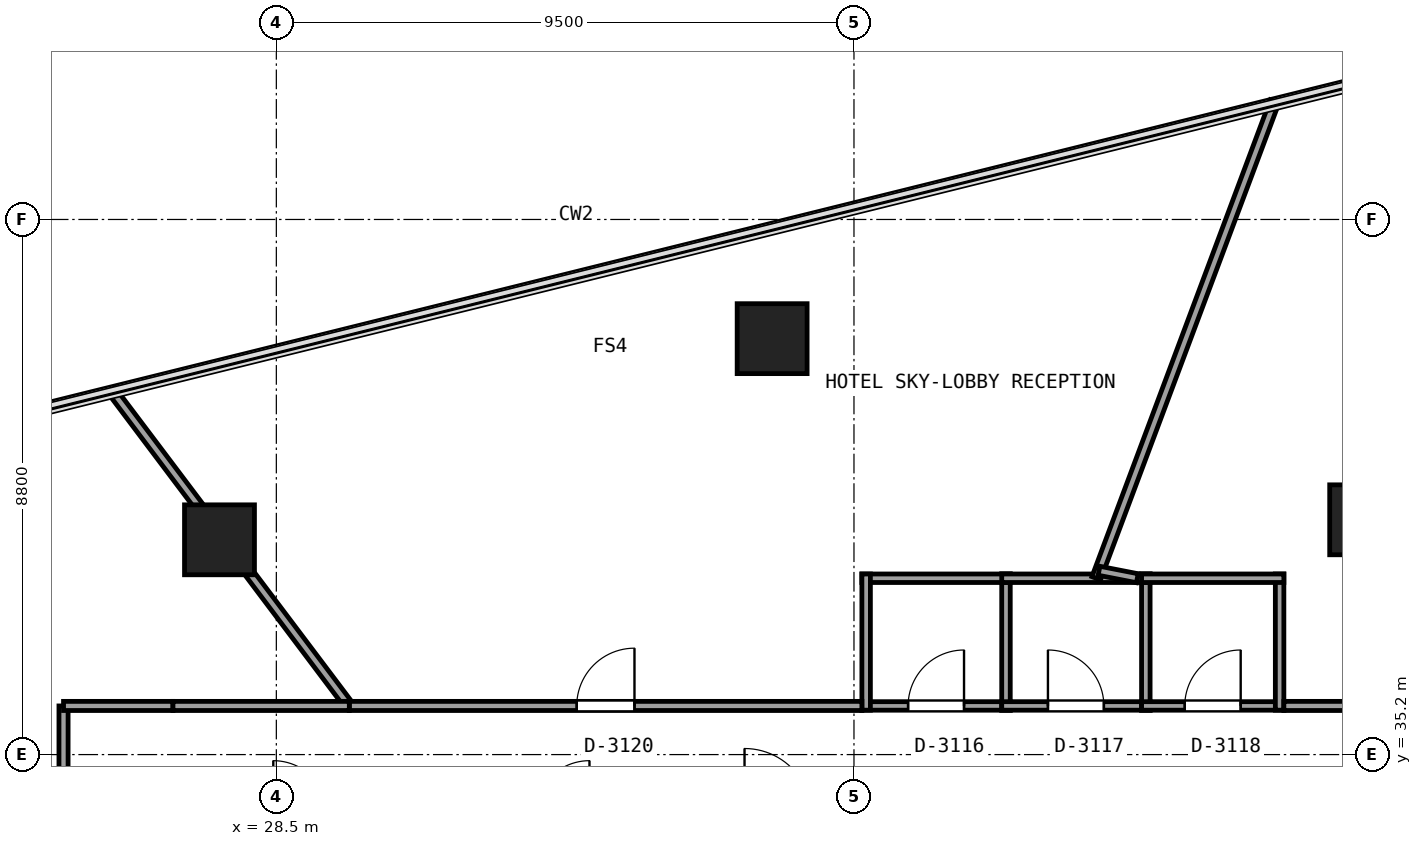
"""IFC4 building model, lengths in metres.
Left out: names, types, materials, properties, quantities, classifications, styles, units other than length and angle.
Written with IfcOpenShell. Run it as: python <this file> out.ifc"""

import sys

from ifc_helpers import new_model, si_unit, direction, frame, frame_2d, origin, origin_2d, place, context, subcontext, project, spatial, rectangle, extrude, element, fill, save


model = new_model("IFC4")
c1 = context("Model", 3, precision=1e-05, world=origin(), true_north=direction((0.0, 1.0)))
c2 = subcontext(c1, "Body", "Model", "MODEL_VIEW")
j1 = project(units=[si_unit("LENGTHUNIT", "METRE"), si_unit("PLANEANGLEUNIT", "RADIAN")], contexts=[c1])
p1 = place(None, origin())
s1 = spatial("IfcSite", under=j1, at=p1, CompositionType="ELEMENT")
p2 = place(p1, origin())
s2 = spatial("IfcBuilding", under=s1, at=p2, CompositionType="ELEMENT")
p3 = place(p2, frame((0.0, 0.0, 117.75)))
s3 = spatial("IfcBuildingStorey", under=s2, at=p3, CompositionType="ELEMENT", Elevation=117.75)
for number, where, z_axis, x_axis in (
    (1, (46.399, 39.061, 0.0), (0.0, 0.0, 1.0), (1.0, 0.0, 0.0)),
    (2, (36.654, 42.04, 0.0), (0.0, 0.0, 1.0), (1.0, 0.0, 0.0)),
    (3, (27.565, 38.732, 0.0), (0.0, 0.0, 1.0), (1.0, 0.0, 0.0)),
):
    element("IfcColumn", number, at=place(p3, frame(where, z_axis=z_axis, x_axis=x_axis)), inside=s3, PredefinedType="COLUMN", context=c2, shape_type="SweptSolid", body=[
        extrude(rectangle(XDim=1.15, YDim=1.15, at=origin_2d()), origin(), (0.0, 0.0, 1.0), 3.09),
    ])
p4 = place(p3, frame((38.13, 36.0, 0.0), z_axis=(0.0, 0.0, 1.0), x_axis=(1.0, 0.0, 0.0)))
e4 = element("IfcWall", 4, at=p4, inside=s3, PredefinedType="PARTITIONING", context=c2, shape_type="SweptSolid", body=[
    extrude(rectangle(XDim=2.44, YDim=0.14, at=frame_2d((1.22, 0.0))), origin(), (0.0, 0.0, 1.0), 3.09),
])
p5 = place(p4, frame((0.76, 0.0, 0.0)))
e5 = element("IfcOpeningElement", 5, at=p5, cuts=e4, PredefinedType="OPENING", context=c2, shape_type="SweptSolid", body=[
    extrude(rectangle(XDim=0.92, YDim=2.1, at=frame_2d((0.46, 1.05))), frame((0.0, 0.08, 0.0), z_axis=(0.0, -1.0, 0.0), x_axis=(1.0, 0.0, 0.0)), (0.0, 0.0, 1.0), 0.16),
])
p6 = place(p3, frame((40.5, 35.93, 0.0), z_axis=(0.0, 0.0, 1.0), x_axis=(0.0, 1.0, 0.0)))
e6 = element("IfcWall", 6, at=p6, inside=s3, PredefinedType="PARTITIONING", context=c2, shape_type="SweptSolid", body=[
    extrude(rectangle(XDim=2.24, YDim=0.14, at=frame_2d((1.12, 0.0))), origin(), (0.0, 0.0, 1.0), 2.763),
])
p7 = place(p3, frame((40.57, 38.1, 0.0), z_axis=(0.0, 0.0, 1.0), x_axis=(-1.0, 0.0, 0.0)))
e7 = element("IfcWall", 7, at=p7, inside=s3, PredefinedType="PARTITIONING", context=c2, shape_type="SweptSolid", body=[
    extrude(rectangle(XDim=2.44, YDim=0.14, at=frame_2d((1.22, 0.0))), origin(), (0.0, 0.0, 1.0), 3.09),
])
p8 = place(p3, frame((38.2, 38.17, 0.0), z_axis=(0.0, 0.0, 1.0), x_axis=(0.0, -1.0, 0.0)))
e8 = element("IfcWall", 8, at=p8, inside=s3, PredefinedType="PARTITIONING", context=c2, shape_type="SweptSolid", body=[
    extrude(rectangle(XDim=2.24, YDim=0.14, at=frame_2d((1.12, 0.0))), origin(), (0.0, 0.0, 1.0), 2.763),
])
p9 = place(p3, frame((40.43, 36.0, 0.0), z_axis=(0.0, 0.0, 1.0), x_axis=(1.0, 0.0, 0.0)))
e9 = element("IfcWall", 9, at=p9, inside=s3, PredefinedType="PARTITIONING", context=c2, shape_type="SweptSolid", body=[
    extrude(rectangle(XDim=2.44, YDim=0.14, at=frame_2d((1.22, 0.0))), origin(), (0.0, 0.0, 1.0), 2.763),
])
p10 = place(p9, frame((0.76, 0.0, 0.0)))
e10 = element("IfcOpeningElement", 10, at=p10, cuts=e9, PredefinedType="OPENING", context=c2, shape_type="SweptSolid", body=[
    extrude(rectangle(XDim=0.92, YDim=2.1, at=frame_2d((0.46, 1.05))), frame((0.0, 0.08, 0.0), z_axis=(0.0, -1.0, 0.0), x_axis=(1.0, 0.0, 0.0)), (0.0, 0.0, 1.0), 0.16),
])
p11 = place(p3, frame((42.8, 35.93, 0.0), z_axis=(0.0, 0.0, 1.0), x_axis=(0.0, 1.0, 0.0)))
e11 = element("IfcWall", 11, at=p11, inside=s3, PredefinedType="PARTITIONING", context=c2, shape_type="SweptSolid", body=[
    extrude(rectangle(XDim=2.24, YDim=0.14, at=frame_2d((1.12, 0.0))), origin(), (0.0, 0.0, 1.0), 2.667),
])
p12 = place(p3, frame((42.87, 38.1, 0.0), z_axis=(0.0, 0.0, 1.0), x_axis=(-1.0, 0.0, 0.0)))
e12 = element("IfcWall", 12, at=p12, inside=s3, PredefinedType="PARTITIONING", context=c2, shape_type="SweptSolid", body=[
    extrude(rectangle(XDim=2.44, YDim=0.14, at=frame_2d((1.22, 0.0))), origin(), (0.0, 0.0, 1.0), 2.667),
])
p13 = place(p3, frame((42.73, 36.0, 0.0), z_axis=(0.0, 0.0, 1.0), x_axis=(1.0, 0.0, 0.0)))
e13 = element("IfcWall", 13, at=p13, inside=s3, PredefinedType="PARTITIONING", context=c2, shape_type="SweptSolid", body=[
    extrude(rectangle(XDim=2.34, YDim=0.14, at=frame_2d((1.17, 0.0))), origin(), (0.0, 0.0, 1.0), 2.387),
])
p14 = place(p13, frame((0.71, 0.0, 0.0)))
e14 = element("IfcOpeningElement", 14, at=p14, cuts=e13, PredefinedType="OPENING", context=c2, shape_type="SweptSolid", body=[
    extrude(rectangle(XDim=0.92, YDim=2.1, at=frame_2d((0.46, 1.05))), frame((0.0, 0.08, 0.0), z_axis=(0.0, -1.0, 0.0), x_axis=(1.0, 0.0, 0.0)), (0.0, 0.0, 1.0), 0.16),
])
p15 = place(p3, frame((45.0, 35.93, 0.0), z_axis=(0.0, 0.0, 1.0), x_axis=(0.0, 1.0, 0.0)))
e15 = element("IfcWall", 15, at=p15, inside=s3, PredefinedType="PARTITIONING", context=c2, shape_type="SweptSolid", body=[
    extrude(rectangle(XDim=2.24, YDim=0.14, at=frame_2d((1.12, 0.0))), origin(), (0.0, 0.0, 1.0), 2.387),
])
p16 = place(p3, frame((45.07, 38.1, 0.0), z_axis=(0.0, 0.0, 1.0), x_axis=(-1.0, 0.0, 0.0)))
e16 = element("IfcWall", 16, at=p16, inside=s3, PredefinedType="PARTITIONING", context=c2, shape_type="SweptSolid", body=[
    extrude(rectangle(XDim=2.34, YDim=0.14, at=frame_2d((1.17, 0.0))), origin(), (0.0, 0.0, 1.0), 2.667),
])
p17 = place(p3, frame((44.919, 45.942, 0.0), z_axis=(0.0, 0.0, 1.0), x_axis=(-0.350535422713, -0.936549474093, 0.0)))
e17 = element("IfcWall", 17, at=p17, inside=s3, PredefinedType="PARTITIONING", context=c2, shape_type="SweptSolid", body=[
    extrude(rectangle(XDim=8.373, YDim=0.15, at=frame_2d((4.187, 0.0))), origin(), (0.0, 0.0, 1.0), 2.375),
])
p18 = place(p3, frame((42.03, 38.223, 0.0), z_axis=(0.0, 0.0, 1.0), x_axis=(0.981520230149, -0.191358401459, 0.0)))
e18 = element("IfcWall", 18, at=p18, inside=s3, PredefinedType="PARTITIONING", context=c2, shape_type="SweptSolid", body=[
    extrude(rectangle(XDim=0.642, YDim=0.15, at=frame_2d((0.321, 0.0))), origin(), (0.0, 0.0, 1.0), 2.667),
])
p19 = place(p3, frame((45.07, 36.0, 0.0), z_axis=(0.0, 0.0, 1.0), x_axis=(1.0, 0.0, 0.0)))
e19 = element("IfcWall", 19, at=p19, inside=s3, PredefinedType="PARTITIONING", context=c2, shape_type="SweptSolid", body=[
    extrude(rectangle(XDim=4.33, YDim=0.15, at=frame_2d((2.165, 0.0))), origin(), (0.0, 0.0, 1.0), 2.375),
])
p20 = place(p3, frame((25.787, 41.193, 0.0), z_axis=(0.0, 0.0, 1.0), x_axis=(0.601770760845, -0.798668862165, 0.0)))
e20 = element("IfcWall", 20, at=p20, inside=s3, PredefinedType="PARTITIONING", context=c2, shape_type="SweptSolid", body=[
    extrude(rectangle(XDim=6.502, YDim=0.15, at=frame_2d((3.251, 0.0))), origin(), (0.0, 0.0, 1.0), 2.387),
])
p21 = place(p3, frame((29.7, 36.0, 0.0), z_axis=(0.0, 0.0, 1.0), x_axis=(1.0, 0.0, 0.0)))
e21 = element("IfcWall", 21, at=p21, inside=s3, PredefinedType="PARTITIONING", context=c2, shape_type="SweptSolid", body=[
    extrude(rectangle(XDim=8.43, YDim=0.15, at=frame_2d((4.215, 0.0))), origin(), (0.0, 0.0, 1.0), 2.387),
])
p22 = place(p21, frame((3.74, 0.0, 0.0)))
e22 = element("IfcOpeningElement", 22, at=p22, cuts=e21, PredefinedType="OPENING", context=c2, shape_type="SweptSolid", body=[
    extrude(rectangle(XDim=0.95, YDim=2.15, at=frame_2d((0.475, 1.075))), frame((0.0, 0.085, 0.0), z_axis=(0.0, -1.0, 0.0), x_axis=(1.0, 0.0, 0.0)), (0.0, 0.0, 1.0), 0.17),
])
p23 = place(p3, frame((25.0, 24.685, 0.0), z_axis=(0.0, 0.0, 1.0), x_axis=(0.0, 1.0, 0.0)))
e23 = element("IfcWall", 23, at=p23, inside=s3, PredefinedType="PARTITIONING", context=c2, shape_type="SweptSolid", body=[
    extrude(rectangle(XDim=11.315, YDim=0.15, at=frame_2d((5.657, 0.0))), origin(), (0.0, 0.0, 1.0), 2.375),
])
p24 = place(p23, frame((5.183, 0.0, 0.0)))
e24 = element("IfcOpeningElement", 24, at=p24, cuts=e23, PredefinedType="OPENING", context=c2, shape_type="SweptSolid", body=[
    extrude(rectangle(XDim=0.95, YDim=2.15, at=frame_2d((0.475, 1.075))), frame((0.0, 0.085, 0.0), z_axis=(0.0, -1.0, 0.0), x_axis=(1.0, 0.0, 0.0)), (0.0, 0.0, 1.0), 0.17),
])
p25 = place(p3, frame((25.0, 36.0, 0.0), z_axis=(0.0, 0.0, 1.0), x_axis=(1.0, 0.0, 0.0)))
e25 = element("IfcWall", 25, at=p25, inside=s3, PredefinedType="PARTITIONING", context=c2, shape_type="SweptSolid", body=[
    extrude(rectangle(XDim=1.8, YDim=0.15, at=frame_2d((0.9, 0.0))), origin(), (0.0, 0.0, 1.0), 2.375),
])
p26 = place(p3, frame((26.8, 36.0, 0.0), z_axis=(0.0, 0.0, 1.0), x_axis=(1.0, 0.0, 0.0)))
e26 = element("IfcWall", 26, at=p26, inside=s3, PredefinedType="PARTITIONING", context=c2, shape_type="SweptSolid", body=[
    extrude(rectangle(XDim=2.9, YDim=0.15, at=frame_2d((1.45, 0.0))), origin(), (0.0, 0.0, 1.0), 2.387),
])
p27 = place(p5, origin())
e27 = element("IfcDoor", 27, at=p27, inside=s3, OperationType="SINGLE_SWING_RIGHT", PredefinedType="DOOR", context=c2, shape_type="SweptSolid", body=[
    extrude(rectangle(XDim=0.92, YDim=2.1, at=frame_2d((0.46, 1.05))), frame((0.0, 0.025, 0.0), z_axis=(0.0, -1.0, 0.0), x_axis=(1.0, 0.0, 0.0)), (0.0, 0.0, 1.0), 0.05),
])
fill(e5, e27)
p28 = place(p10, origin())
e28 = element("IfcDoor", 28, at=p28, inside=s3, OperationType="SINGLE_SWING_LEFT", PredefinedType="DOOR", context=c2, shape_type="SweptSolid", body=[
    extrude(rectangle(XDim=0.92, YDim=2.1, at=frame_2d((0.46, 1.05))), frame((0.0, 0.025, 0.0), z_axis=(0.0, -1.0, 0.0), x_axis=(1.0, 0.0, 0.0)), (0.0, 0.0, 1.0), 0.05),
])
fill(e10, e28)
p29 = place(p14, origin())
e29 = element("IfcDoor", 29, at=p29, inside=s3, OperationType="SINGLE_SWING_RIGHT", PredefinedType="DOOR", context=c2, shape_type="SweptSolid", body=[
    extrude(rectangle(XDim=0.92, YDim=2.1, at=frame_2d((0.46, 1.05))), frame((0.0, 0.025, 0.0), z_axis=(0.0, -1.0, 0.0), x_axis=(1.0, 0.0, 0.0)), (0.0, 0.0, 1.0), 0.05),
])
fill(e14, e29)
p30 = place(p22, origin())
e30 = element("IfcDoor", 30, at=p30, inside=s3, OperationType="SINGLE_SWING_RIGHT", PredefinedType="DOOR", context=c2, shape_type="SweptSolid", body=[
    extrude(rectangle(XDim=0.95, YDim=2.15, at=frame_2d((0.475, 1.075))), frame((0.0, 0.025, 0.0), z_axis=(0.0, -1.0, 0.0), x_axis=(1.0, 0.0, 0.0)), (0.0, 0.0, 1.0), 0.05),
])
fill(e22, e30)
save(model, sys.argv[1])
